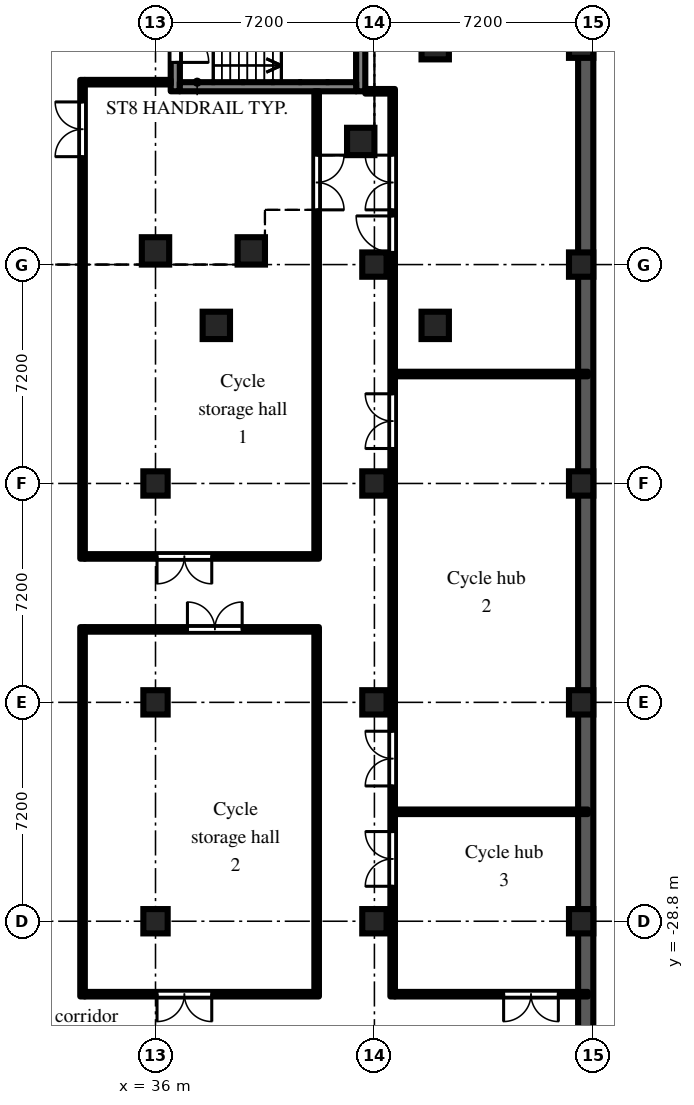
"""IFC4 building model, lengths in metres.
Left out: names, types, materials, properties, quantities, classifications, styles, units other than length and angle.
Written with IfcOpenShell. Run it as: python <this file> out.ifc"""

import sys

from ifc_helpers import new_model, si_unit, direction, frame, frame_2d, origin, origin_2d, place, context, subcontext, project, spatial, rectangle, extrude, element, fill, save


model = new_model("IFC4")
c1 = context("Model", 3, precision=1e-05, world=origin(), true_north=direction((0.0, 1.0)))
c2 = subcontext(c1, "Body", "Model", "MODEL_VIEW")
j1 = project(units=[si_unit("LENGTHUNIT", "METRE"), si_unit("PLANEANGLEUNIT", "RADIAN")], contexts=[c1])
p1 = place(None, origin())
s1 = spatial("IfcSite", under=j1, at=p1, CompositionType="ELEMENT")
p2 = place(p1, origin())
s2 = spatial("IfcBuilding", under=s1, at=p2, CompositionType="ELEMENT")
p3 = place(p2, frame((0.0, 0.0, -4.8)))
s3 = spatial("IfcBuildingStorey", under=s2, at=p3, CompositionType="ELEMENT", Elevation=-4.8)
p4 = place(p3, frame((50.15, -49.9, -0.5), z_axis=(0.0, 0.0, 1.0), x_axis=(0.0, 1.0, 0.0)))
e1 = element("IfcWall", 1, at=p4, inside=s3, PredefinedType="SOLIDWALL", context=c2, shape_type="SweptSolid", body=[
    extrude(rectangle(XDim=99.8, YDim=0.5, at=frame_2d((49.9, 0.0))), origin(), (0.0, 0.0, 1.0), 5.3),
])
for number, where, z_axis, x_axis in (
    (2, (36.0, -6.75, -0.5), (0.0, 0.0, 1.0), (1.0, 0.0, 0.0)),
    (3, (39.15, -6.75, -0.5), (0.0, 0.0, 1.0), (1.0, 0.0, 0.0)),
    (4, (42.75, -3.15, -0.5), (0.0, 0.0, 1.0), (1.0, 0.0, 0.0)),
):
    element("IfcColumn", number, at=place(p3, frame(where, z_axis=z_axis, x_axis=x_axis)), inside=s3, PredefinedType="COLUMN", context=c2, shape_type="SweptSolid", body=[
        extrude(rectangle(XDim=0.9, YDim=0.9, at=origin_2d()), origin(), (0.0, 0.0, 1.0), 5.3),
    ])
for number, where, z_axis, x_axis in (
    (5, (36.0, -28.8, -0.5), (0.0, 0.0, 1.0), (1.0, 0.0, 0.0)),
    (6, (36.0, -21.6, -0.5), (0.0, 0.0, 1.0), (1.0, 0.0, 0.0)),
    (7, (36.0, -14.4, -0.5), (0.0, 0.0, 1.0), (1.0, 0.0, 0.0)),
    (8, (43.2, -28.8, -0.5), (0.0, 0.0, 1.0), (1.0, 0.0, 0.0)),
    (9, (43.2, -21.6, -0.5), (0.0, 0.0, 1.0), (1.0, 0.0, 0.0)),
    (10, (43.2, -14.4, -0.5), (0.0, 0.0, 1.0), (1.0, 0.0, 0.0)),
    (11, (43.2, -7.2, -0.5), (0.0, 0.0, 1.0), (1.0, 0.0, 0.0)),
    (12, (50.0, -28.8, -0.5), (0.0, 0.0, 1.0), (1.0, 0.0, 0.0)),
    (13, (50.0, -21.6, -0.5), (0.0, 0.0, 1.0), (1.0, 0.0, 0.0)),
    (14, (50.0, -14.4, -0.5), (0.0, 0.0, 1.0), (1.0, 0.0, 0.0)),
    (15, (50.0, -7.2, -0.5), (0.0, 0.0, 1.0), (1.0, 0.0, 0.0)),
    (16, (50.0, 0.0, -0.5), (0.0, 0.0, 1.0), (1.0, 0.0, 0.0)),
):
    element("IfcColumn", number, at=place(p3, frame(where, z_axis=z_axis, x_axis=x_axis)), inside=s3, PredefinedType="COLUMN", context=c2, shape_type="SweptSolid", body=[
        extrude(rectangle(XDim=0.8, YDim=0.8, at=origin_2d()), origin(), (0.0, 0.0, 1.0), 5.3),
    ])
for number, where, z_axis, x_axis in (
    (17, (38.0, -9.2, -0.5), (0.0, 0.0, 1.0), (1.0, 0.0, 0.0)),
    (18, (45.2, -9.2, -0.5), (0.0, 0.0, 1.0), (1.0, 0.0, 0.0)),
    (19, (45.2, 0.0, -0.5), (0.0, 0.0, 1.0), (1.0, 0.0, 0.0)),
):
    element("IfcColumn", number, at=place(p3, frame(where, z_axis=z_axis, x_axis=x_axis)), inside=s3, PredefinedType="COLUMN", context=c2, shape_type="SweptSolid", body=[
        extrude(rectangle(XDim=0.9, YDim=0.9, at=origin_2d()), origin(), (0.0, 0.0, 1.0), 5.3),
    ])
p5 = place(p3, frame((36.65, -1.5, 0.0), z_axis=(0.0, 0.0, 1.0), x_axis=(0.0, 1.0, 0.0)))
e20 = element("IfcWall", 20, at=p5, inside=s3, PredefinedType="SHEAR", context=c2, shape_type="SweptSolid", body=[
    extrude(rectangle(XDim=3.0, YDim=0.3, at=frame_2d((1.5, 0.0))), origin(), (0.0, 0.0, 1.0), 4.35),
])
p6 = place(p5, frame((0.95, 0.0, 0.0)))
e21 = element("IfcOpeningElement", 21, at=p6, cuts=e20, PredefinedType="OPENING", context=c2, shape_type="SweptSolid", body=[
    extrude(rectangle(XDim=1.1, YDim=2.1, at=frame_2d((0.55, 1.05))), frame((0.0, 0.16, 0.0), z_axis=(0.0, -1.0, 0.0), x_axis=(1.0, 0.0, 0.0)), (0.0, 0.0, 1.0), 0.32),
])
p7 = place(p3, frame((42.75, -1.5, 0.0), z_axis=(0.0, 0.0, 1.0), x_axis=(0.0, 1.0, 0.0)))
e22 = element("IfcWall", 22, at=p7, inside=s3, PredefinedType="SHEAR", context=c2, shape_type="SweptSolid", body=[
    extrude(rectangle(XDim=3.0, YDim=0.3, at=frame_2d((1.5, 0.0))), origin(), (0.0, 0.0, 1.0), 4.35),
])
p8 = place(p3, frame((36.8, -1.35, 0.0), z_axis=(0.0, 0.0, 1.0), x_axis=(1.0, 0.0, 0.0)))
e23 = element("IfcWall", 23, at=p8, inside=s3, PredefinedType="SHEAR", context=c2, shape_type="SweptSolid", body=[
    extrude(rectangle(XDim=5.8, YDim=0.3, at=frame_2d((2.9, 0.0))), origin(), (0.0, 0.0, 1.0), 4.35),
])
p9 = place(p3, frame((33.6, -31.275, 0.0), z_axis=(0.0, 0.0, 1.0), x_axis=(0.0, 1.0, 0.0)))
e24 = element("IfcWall", 24, at=p9, inside=s3, PredefinedType="PARTITIONING", context=c2, shape_type="SweptSolid", body=[
    extrude(rectangle(XDim=12.15, YDim=0.15, at=frame_2d((6.075, 0.0))), origin(), (0.0, 0.0, 1.0), 4.35),
])
p10 = place(p3, frame((33.675, -31.2, 0.0), z_axis=(0.0, 0.0, 1.0), x_axis=(1.0, 0.0, 0.0)))
e25 = element("IfcWall", 25, at=p10, inside=s3, PredefinedType="PARTITIONING", context=c2, shape_type="SweptSolid", body=[
    extrude(rectangle(XDim=7.7, YDim=0.15, at=frame_2d((3.85, 0.0))), origin(), (0.0, 0.0, 1.0), 4.35),
])
p11 = place(p10, frame((2.375, 0.0, 0.0)))
e26 = element("IfcOpeningElement", 26, at=p11, cuts=e25, PredefinedType="OPENING", context=c2, shape_type="SweptSolid", body=[
    extrude(rectangle(XDim=1.8, YDim=2.1, at=frame_2d((0.9, 1.05))), frame((0.0, 0.085, 0.0), z_axis=(0.0, -1.0, 0.0), x_axis=(1.0, 0.0, 0.0)), (0.0, 0.0, 1.0), 0.17),
])
p12 = place(p3, frame((33.675, -19.2, 0.0), z_axis=(0.0, 0.0, 1.0), x_axis=(1.0, 0.0, 0.0)))
e27 = element("IfcWall", 27, at=p12, inside=s3, PredefinedType="PARTITIONING", context=c2, shape_type="SweptSolid", body=[
    extrude(rectangle(XDim=7.7, YDim=0.15, at=frame_2d((3.85, 0.0))), origin(), (0.0, 0.0, 1.0), 4.35),
])
p13 = place(p12, frame((3.375, 0.0, 0.0)))
e28 = element("IfcOpeningElement", 28, at=p13, cuts=e27, PredefinedType="OPENING", context=c2, shape_type="SweptSolid", body=[
    extrude(rectangle(XDim=1.8, YDim=2.1, at=frame_2d((0.9, 1.05))), frame((0.0, 0.085, 0.0), z_axis=(0.0, -1.0, 0.0), x_axis=(1.0, 0.0, 0.0)), (0.0, 0.0, 1.0), 0.17),
])
p14 = place(p3, frame((33.6, -16.875, 0.0), z_axis=(0.0, 0.0, 1.0), x_axis=(0.0, 1.0, 0.0)))
e29 = element("IfcWall", 29, at=p14, inside=s3, PredefinedType="PARTITIONING", context=c2, shape_type="SweptSolid", body=[
    extrude(rectangle(XDim=15.75, YDim=0.15, at=frame_2d((7.875, 0.0))), origin(), (0.0, 0.0, 1.0), 4.35),
])
p15 = place(p14, frame((13.225, 0.0, 0.0)))
e30 = element("IfcOpeningElement", 30, at=p15, cuts=e29, PredefinedType="OPENING", context=c2, shape_type="SweptSolid", body=[
    extrude(rectangle(XDim=1.8, YDim=2.1, at=frame_2d((0.9, 1.05))), frame((0.0, 0.085, 0.0), z_axis=(0.0, -1.0, 0.0), x_axis=(1.0, 0.0, 0.0)), (0.0, 0.0, 1.0), 0.17),
])
p16 = place(p3, frame((33.675, -16.8, 0.0), z_axis=(0.0, 0.0, 1.0), x_axis=(1.0, 0.0, 0.0)))
e31 = element("IfcWall", 31, at=p16, inside=s3, PredefinedType="PARTITIONING", context=c2, shape_type="SweptSolid", body=[
    extrude(rectangle(XDim=7.7, YDim=0.15, at=frame_2d((3.85, 0.0))), origin(), (0.0, 0.0, 1.0), 4.35),
])
p17 = place(p16, frame((2.375, 0.0, 0.0)))
e32 = element("IfcOpeningElement", 32, at=p17, cuts=e31, PredefinedType="OPENING", context=c2, shape_type="SweptSolid", body=[
    extrude(rectangle(XDim=1.8, YDim=2.1, at=frame_2d((0.9, 1.05))), frame((0.0, 0.085, 0.0), z_axis=(0.0, -1.0, 0.0), x_axis=(1.0, 0.0, 0.0)), (0.0, 0.0, 1.0), 0.17),
])
p18 = place(p3, frame((33.675, -1.2, 0.0), z_axis=(0.0, 0.0, 1.0), x_axis=(1.0, 0.0, 0.0)))
e33 = element("IfcWall", 33, at=p18, inside=s3, PredefinedType="PARTITIONING", context=c2, shape_type="SweptSolid", body=[
    extrude(rectangle(XDim=2.825, YDim=0.15, at=frame_2d((1.413, 0.0))), origin(), (0.0, 0.0, 1.0), 4.35),
])
p19 = place(p3, frame((41.3, -31.125, 0.0), z_axis=(0.0, 0.0, 1.0), x_axis=(0.0, 1.0, 0.0)))
e34 = element("IfcWall", 34, at=p19, inside=s3, PredefinedType="PARTITIONING", context=c2, shape_type="SweptSolid", body=[
    extrude(rectangle(XDim=11.85, YDim=0.15, at=frame_2d((5.925, 0.0))), origin(), (0.0, 0.0, 1.0), 4.35),
])
p20 = place(p3, frame((41.3, -16.725, 0.0), z_axis=(0.0, 0.0, 1.0), x_axis=(0.0, 1.0, 0.0)))
e35 = element("IfcWall", 35, at=p20, inside=s3, PredefinedType="PARTITIONING", context=c2, shape_type="SweptSolid", body=[
    extrude(rectangle(XDim=15.225, YDim=0.15, at=frame_2d((7.613, 0.0))), origin(), (0.0, 0.0, 1.0), 4.35),
])
p21 = place(p20, frame((11.325, 0.0, 0.0)))
e36 = element("IfcOpeningElement", 36, at=p21, cuts=e35, PredefinedType="OPENING", context=c2, shape_type="SweptSolid", body=[
    extrude(rectangle(XDim=1.8, YDim=2.1, at=frame_2d((0.9, 1.05))), frame((0.0, 0.085, 0.0), z_axis=(0.0, -1.0, 0.0), x_axis=(1.0, 0.0, 0.0)), (0.0, 0.0, 1.0), 0.17),
])
p22 = place(p3, frame((42.9, -1.5, 0.0), z_axis=(0.0, 0.0, 1.0), x_axis=(1.0, 0.0, 0.0)))
e37 = element("IfcWall", 37, at=p22, inside=s3, PredefinedType="PARTITIONING", context=c2, shape_type="SweptSolid", body=[
    extrude(rectangle(XDim=0.975, YDim=0.15, at=frame_2d((0.488, 0.0))), origin(), (0.0, 0.0, 1.0), 4.35),
])
p23 = place(p3, frame((43.8, -31.275, 0.0), z_axis=(0.0, 0.0, 1.0), x_axis=(0.0, 1.0, 0.0)))
e38 = element("IfcWall", 38, at=p23, inside=s3, PredefinedType="PARTITIONING", context=c2, shape_type="SweptSolid", body=[
    extrude(rectangle(XDim=29.7, YDim=0.15, at=frame_2d((14.85, 0.0))), origin(), (0.0, 0.0, 1.0), 4.35),
])
p24 = place(p23, frame((3.625, 0.0, 0.0)))
e39 = element("IfcOpeningElement", 39, at=p24, cuts=e38, PredefinedType="OPENING", context=c2, shape_type="SweptSolid", body=[
    extrude(rectangle(XDim=1.8, YDim=2.1, at=frame_2d((0.9, 1.05))), frame((0.0, 0.085, 0.0), z_axis=(0.0, -1.0, 0.0), x_axis=(1.0, 0.0, 0.0)), (0.0, 0.0, 1.0), 0.17),
])
p25 = place(p23, frame((24.475, 0.0, 0.0)))
e40 = element("IfcOpeningElement", 40, at=p25, cuts=e38, PredefinedType="OPENING", context=c2, shape_type="SweptSolid", body=[
    extrude(rectangle(XDim=1.2, YDim=2.1, at=frame_2d((0.6, 1.05))), frame((0.0, 0.085, 0.0), z_axis=(0.0, -1.0, 0.0), x_axis=(1.0, 0.0, 0.0)), (0.0, 0.0, 1.0), 0.17),
])
p26 = place(p23, frame((25.875, 0.0, 0.0)))
e41 = element("IfcOpeningElement", 41, at=p26, cuts=e38, PredefinedType="OPENING", context=c2, shape_type="SweptSolid", body=[
    extrude(rectangle(XDim=1.8, YDim=2.1, at=frame_2d((0.9, 1.05))), frame((0.0, 0.085, 0.0), z_axis=(0.0, -1.0, 0.0), x_axis=(1.0, 0.0, 0.0)), (0.0, 0.0, 1.0), 0.17),
])
p27 = place(p23, frame((6.925, 0.0, 0.0)))
e42 = element("IfcOpeningElement", 42, at=p27, cuts=e38, PredefinedType="OPENING", context=c2, shape_type="SweptSolid", body=[
    extrude(rectangle(XDim=1.8, YDim=2.1, at=frame_2d((0.9, 1.05))), frame((0.0, 0.085, 0.0), z_axis=(0.0, -1.0, 0.0), x_axis=(1.0, 0.0, 0.0)), (0.0, 0.0, 1.0), 0.17),
])
p28 = place(p23, frame((18.025, 0.0, 0.0)))
e43 = element("IfcOpeningElement", 43, at=p28, cuts=e38, PredefinedType="OPENING", context=c2, shape_type="SweptSolid", body=[
    extrude(rectangle(XDim=1.8, YDim=2.1, at=frame_2d((0.9, 1.05))), frame((0.0, 0.085, 0.0), z_axis=(0.0, -1.0, 0.0), x_axis=(1.0, 0.0, 0.0)), (0.0, 0.0, 1.0), 0.17),
])
p29 = place(p3, frame((43.875, -31.2, 0.0), z_axis=(0.0, 0.0, 1.0), x_axis=(1.0, 0.0, 0.0)))
e44 = element("IfcWall", 44, at=p29, inside=s3, PredefinedType="PARTITIONING", context=c2, shape_type="SweptSolid", body=[
    extrude(rectangle(XDim=6.345, YDim=0.15, at=frame_2d((3.172, 0.0))), origin(), (0.0, 0.0, 1.0), 4.35),
])
p30 = place(p29, frame((3.575, 0.0, 0.0)))
e45 = element("IfcOpeningElement", 45, at=p30, cuts=e44, PredefinedType="OPENING", context=c2, shape_type="SweptSolid", body=[
    extrude(rectangle(XDim=1.8, YDim=2.1, at=frame_2d((0.9, 1.05))), frame((0.0, 0.085, 0.0), z_axis=(0.0, -1.0, 0.0), x_axis=(1.0, 0.0, 0.0)), (0.0, 0.0, 1.0), 0.17),
])
for number, where, z_axis, x_axis in (
    (46, (43.875, -25.2, 0.0), (0.0, 0.0, 1.0), (1.0, 0.0, 0.0)),
    (47, (43.875, -10.8, 0.0), (0.0, 0.0, 1.0), (1.0, 0.0, 0.0)),
):
    element("IfcWall", number, at=place(p3, frame(where, z_axis=z_axis, x_axis=x_axis)), inside=s3, PredefinedType="PARTITIONING", context=c2, shape_type="SweptSolid", body=[
        extrude(rectangle(XDim=6.345, YDim=0.15, at=frame_2d((3.172, 0.0))), origin(), (0.0, 0.0, 1.0), 4.35),
    ])
p31 = place(p6, frame((1.1, 0.0, 0.0), z_axis=(0.0, 0.0, 1.0), x_axis=(-1.0, 0.0, 0.0)))
e48 = element("IfcDoor", 48, at=p31, inside=s3, OperationType="SINGLE_SWING_RIGHT", PredefinedType="DOOR", context=c2, shape_type="SweptSolid", body=[
    extrude(rectangle(XDim=1.1, YDim=2.1, at=frame_2d((0.55, 1.05))), frame((0.0, 0.025, 0.0), z_axis=(0.0, -1.0, 0.0), x_axis=(1.0, 0.0, 0.0)), (0.0, 0.0, 1.0), 0.05),
])
fill(e21, e48)
p32 = place(p11, frame((1.8, 0.0, 0.0), z_axis=(0.0, 0.0, 1.0), x_axis=(-1.0, 0.0, 0.0)))
e49 = element("IfcDoor", 49, at=p32, inside=s3, OperationType="DOUBLE_DOOR_DOUBLE_SWING", PredefinedType="DOOR", context=c2, shape_type="SweptSolid", body=[
    extrude(rectangle(XDim=1.8, YDim=2.1, at=frame_2d((0.9, 1.05))), frame((0.0, 0.025, 0.0), z_axis=(0.0, -1.0, 0.0), x_axis=(1.0, 0.0, 0.0)), (0.0, 0.0, 1.0), 0.05),
])
fill(e26, e49)
p33 = place(p13, origin())
e50 = element("IfcDoor", 50, at=p33, inside=s3, OperationType="DOUBLE_DOOR_DOUBLE_SWING", PredefinedType="DOOR", context=c2, shape_type="SweptSolid", body=[
    extrude(rectangle(XDim=1.8, YDim=2.1, at=frame_2d((0.9, 1.05))), frame((0.0, 0.025, 0.0), z_axis=(0.0, -1.0, 0.0), x_axis=(1.0, 0.0, 0.0)), (0.0, 0.0, 1.0), 0.05),
])
fill(e28, e50)
p34 = place(p24, origin())
e51 = element("IfcDoor", 51, at=p34, inside=s3, OperationType="DOUBLE_DOOR_DOUBLE_SWING", PredefinedType="DOOR", context=c2, shape_type="SweptSolid", body=[
    extrude(rectangle(XDim=1.8, YDim=2.1, at=frame_2d((0.9, 1.05))), frame((0.0, 0.025, 0.0), z_axis=(0.0, -1.0, 0.0), x_axis=(1.0, 0.0, 0.0)), (0.0, 0.0, 1.0), 0.05),
])
fill(e39, e51)
p35 = place(p30, frame((1.8, 0.0, 0.0), z_axis=(0.0, 0.0, 1.0), x_axis=(-1.0, 0.0, 0.0)))
e52 = element("IfcDoor", 52, at=p35, inside=s3, OperationType="DOUBLE_DOOR_DOUBLE_SWING", PredefinedType="DOOR", context=c2, shape_type="SweptSolid", body=[
    extrude(rectangle(XDim=1.8, YDim=2.1, at=frame_2d((0.9, 1.05))), frame((0.0, 0.025, 0.0), z_axis=(0.0, -1.0, 0.0), x_axis=(1.0, 0.0, 0.0)), (0.0, 0.0, 1.0), 0.05),
])
fill(e45, e52)
p36 = place(p25, origin())
e53 = element("IfcDoor", 53, at=p36, inside=s3, OperationType="SINGLE_SWING_RIGHT", PredefinedType="DOOR", context=c2, shape_type="SweptSolid", body=[
    extrude(rectangle(XDim=1.2, YDim=2.1, at=frame_2d((0.6, 1.05))), frame((0.0, 0.025, 0.0), z_axis=(0.0, -1.0, 0.0), x_axis=(1.0, 0.0, 0.0)), (0.0, 0.0, 1.0), 0.05),
])
fill(e40, e53)
p37 = place(p26, origin())
e54 = element("IfcDoor", 54, at=p37, inside=s3, OperationType="DOUBLE_DOOR_DOUBLE_SWING", PredefinedType="DOOR", context=c2, shape_type="SweptSolid", body=[
    extrude(rectangle(XDim=1.8, YDim=2.1, at=frame_2d((0.9, 1.05))), frame((0.0, 0.025, 0.0), z_axis=(0.0, -1.0, 0.0), x_axis=(1.0, 0.0, 0.0)), (0.0, 0.0, 1.0), 0.05),
])
fill(e41, e54)
p38 = place(p15, origin())
e55 = element("IfcDoor", 55, at=p38, inside=s3, OperationType="DOUBLE_DOOR_DOUBLE_SWING", PredefinedType="DOOR", context=c2, shape_type="SweptSolid", body=[
    extrude(rectangle(XDim=1.8, YDim=2.1, at=frame_2d((0.9, 1.05))), frame((0.0, 0.025, 0.0), z_axis=(0.0, -1.0, 0.0), x_axis=(1.0, 0.0, 0.0)), (0.0, 0.0, 1.0), 0.05),
])
fill(e30, e55)
p39 = place(p17, frame((1.8, 0.0, 0.0), z_axis=(0.0, 0.0, 1.0), x_axis=(-1.0, 0.0, 0.0)))
e56 = element("IfcDoor", 56, at=p39, inside=s3, OperationType="DOUBLE_DOOR_DOUBLE_SWING", PredefinedType="DOOR", context=c2, shape_type="SweptSolid", body=[
    extrude(rectangle(XDim=1.8, YDim=2.1, at=frame_2d((0.9, 1.05))), frame((0.0, 0.025, 0.0), z_axis=(0.0, -1.0, 0.0), x_axis=(1.0, 0.0, 0.0)), (0.0, 0.0, 1.0), 0.05),
])
fill(e32, e56)
p40 = place(p21, frame((1.8, 0.0, 0.0), z_axis=(0.0, 0.0, 1.0), x_axis=(-1.0, 0.0, 0.0)))
e57 = element("IfcDoor", 57, at=p40, inside=s3, OperationType="DOUBLE_DOOR_DOUBLE_SWING", PredefinedType="DOOR", context=c2, shape_type="SweptSolid", body=[
    extrude(rectangle(XDim=1.8, YDim=2.1, at=frame_2d((0.9, 1.05))), frame((0.0, 0.025, 0.0), z_axis=(0.0, -1.0, 0.0), x_axis=(1.0, 0.0, 0.0)), (0.0, 0.0, 1.0), 0.05),
])
fill(e36, e57)
p41 = place(p27, origin())
e58 = element("IfcDoor", 58, at=p41, inside=s3, OperationType="DOUBLE_DOOR_DOUBLE_SWING", PredefinedType="DOOR", context=c2, shape_type="SweptSolid", body=[
    extrude(rectangle(XDim=1.8, YDim=2.1, at=frame_2d((0.9, 1.05))), frame((0.0, 0.025, 0.0), z_axis=(0.0, -1.0, 0.0), x_axis=(1.0, 0.0, 0.0)), (0.0, 0.0, 1.0), 0.05),
])
fill(e42, e58)
p42 = place(p28, origin())
e59 = element("IfcDoor", 59, at=p42, inside=s3, OperationType="DOUBLE_DOOR_DOUBLE_SWING", PredefinedType="DOOR", context=c2, shape_type="SweptSolid", body=[
    extrude(rectangle(XDim=1.8, YDim=2.1, at=frame_2d((0.9, 1.05))), frame((0.0, 0.025, 0.0), z_axis=(0.0, -1.0, 0.0), x_axis=(1.0, 0.0, 0.0)), (0.0, 0.0, 1.0), 0.05),
])
fill(e43, e59)
save(model, sys.argv[1])
